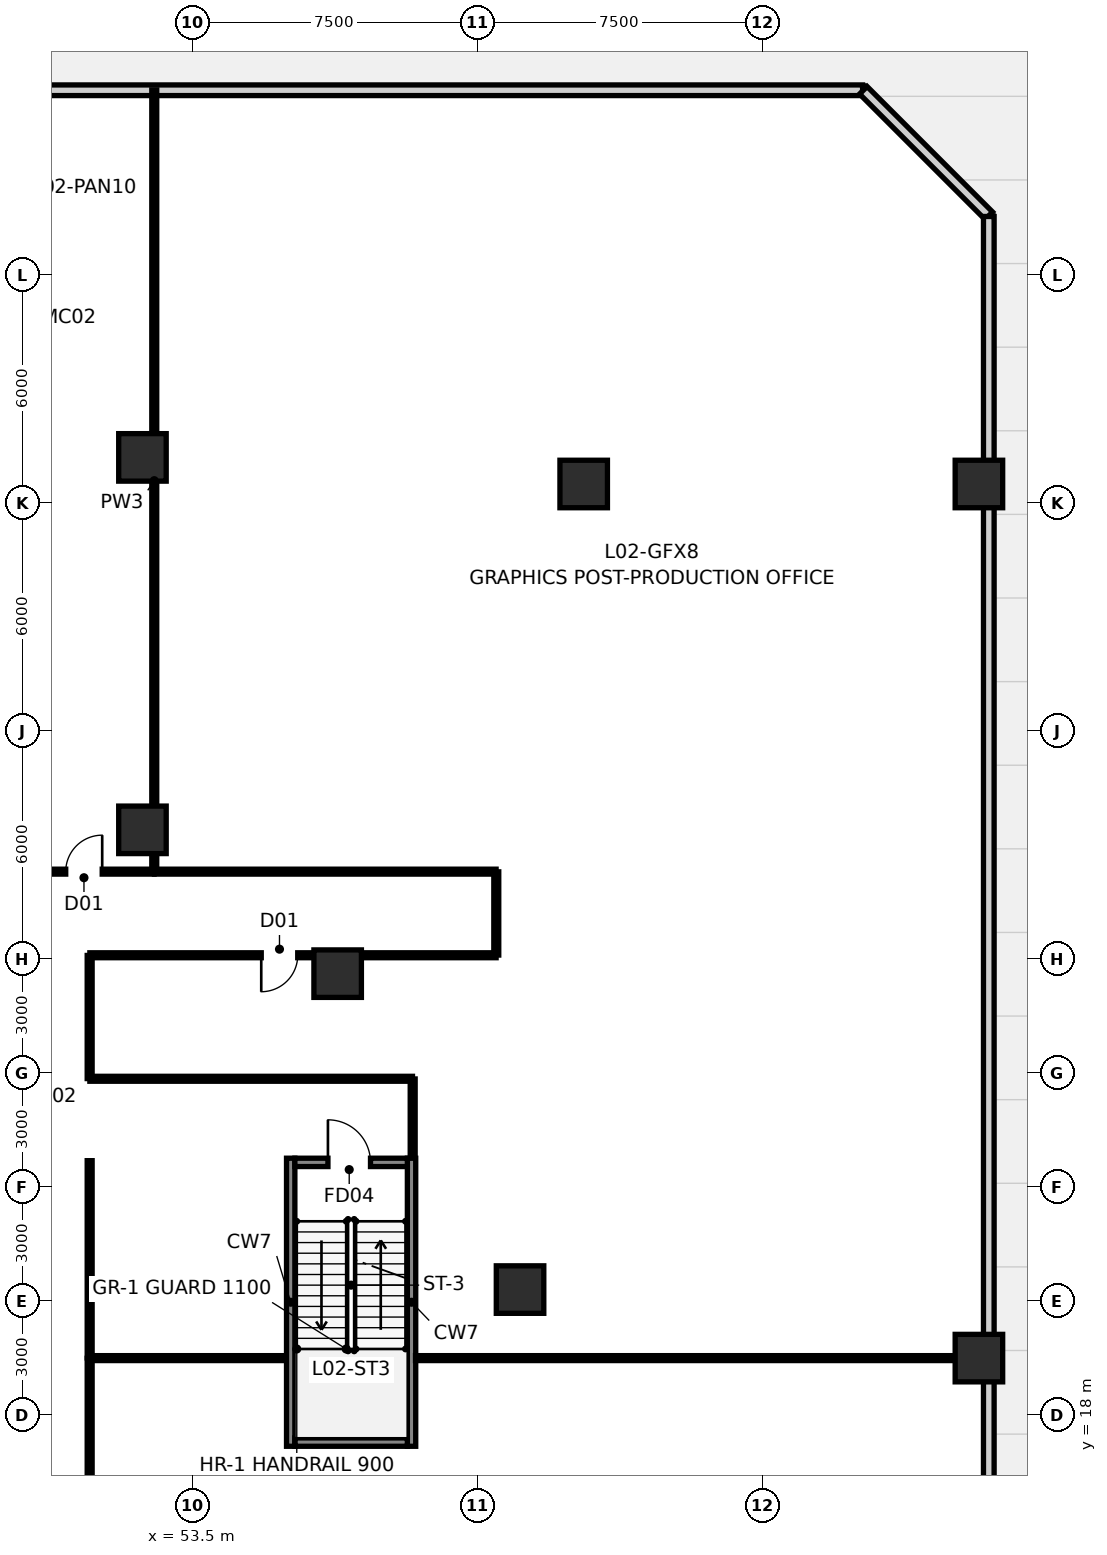
"""IFC4 building model, lengths in metres.
Left out: names, types, materials, properties, quantities, classifications, styles, units other than length and angle.
Written with IfcOpenShell. Run it as: python <this file> out.ifc"""

import sys

from ifc_helpers import new_model, si_unit, direction, frame, frame_2d, origin, origin_2d, place, context, subcontext, project, spatial, rectangle, hollow_rectangle, extrude, source, transform, mapped, element, fill, save


model = new_model("IFC4")
c1 = context("Model", 3, precision=1e-05, world=origin(), true_north=direction((0.0, 1.0)))
c2 = subcontext(c1, "Body", "Model", "MODEL_VIEW")
j1 = project(units=[si_unit("LENGTHUNIT", "METRE"), si_unit("PLANEANGLEUNIT", "RADIAN")], contexts=[c1])
p1 = place(None, origin())
s1 = spatial("IfcSite", under=j1, at=p1, CompositionType="ELEMENT")
p2 = place(p1, origin())
s2 = spatial("IfcBuilding", under=s1, at=p2, CompositionType="ELEMENT")
p3 = place(p2, frame((0.0, 0.0, 10.2)))
s3 = spatial("IfcBuildingStorey", under=s2, at=p3, CompositionType="ELEMENT", Elevation=10.2)
for number, where, z_axis, x_axis in (
    (1, (56.09, 17.18, 0.0), (0.0, 0.0, 1.0), (0.0, 1.0, 0.0)),
    (2, (59.27, 17.18, 0.0), (0.0, 0.0, 1.0), (0.0, 1.0, 0.0)),
):
    element("IfcWall", number, at=place(p3, frame(where, z_axis=z_axis, x_axis=x_axis)), inside=s3, PredefinedType="SHEAR", context=c2, shape_type="SweptSolid", body=[
        extrude(rectangle(XDim=7.58, YDim=0.22, at=frame_2d((3.79, 0.0))), origin(), (0.0, 0.0, 1.0), 4.5),
    ])
p4 = place(p3, frame((56.2, 17.29, 0.0), z_axis=(0.0, 0.0, 1.0), x_axis=(1.0, 0.0, 0.0)))
e3 = element("IfcWall", 3, at=p4, inside=s3, PredefinedType="SHEAR", context=c2, shape_type="SweptSolid", body=[
    extrude(rectangle(XDim=2.96, YDim=0.22, at=frame_2d((1.48, 0.0))), origin(), (0.0, 0.0, 1.0), 4.5),
])
p5 = place(p3, frame((56.2, 24.65, 0.0), z_axis=(0.0, 0.0, 1.0), x_axis=(1.0, 0.0, 0.0)))
e4 = element("IfcWall", 4, at=p5, inside=s3, PredefinedType="SHEAR", context=c2, shape_type="SweptSolid", body=[
    extrude(rectangle(XDim=2.96, YDim=0.22, at=frame_2d((1.48, 0.0))), origin(), (0.0, 0.0, 1.0), 4.5),
])
p6 = place(p5, frame((0.87, 0.0, 0.0)))
e5 = element("IfcOpeningElement", 5, at=p6, cuts=e4, PredefinedType="OPENING", context=c2, shape_type="SweptSolid", body=[
    extrude(rectangle(XDim=1.12, YDim=2.15, at=frame_2d((0.56, 1.075))), frame((0.0, 0.122, 0.0), z_axis=(0.0, -1.0, 0.0), x_axis=(1.0, 0.0, 0.0)), (0.0, 0.0, 1.0), 0.244),
])
m1 = source(origin(), c2, "Body", "SweptSolid", [
    extrude(hollow_rectangle(XDim=1.25, YDim=1.25, WallThickness=0.07, at=origin_2d()), origin(), (0.0, 0.0, 1.0), 4.501),
])
p7 = place(p3, frame((62.125, 21.303, 0.0), z_axis=(-0.010413686595, -0.021532466552, 0.999713913085), x_axis=(0.90024527341, -0.435383104521, 0.0)))
e6 = element("IfcColumn", 6, at=p7, inside=s3, PredefinedType="COLUMN", context=c2, shape_type="MappedRepresentation", body=[
    mapped(m1, transform((0.0, 0.0, 0.0), scale=1.0)),
])
m2 = source(origin(), c2, "Body", "SweptSolid", [
    extrude(hollow_rectangle(XDim=1.25, YDim=1.25, WallThickness=0.07, at=origin_2d()), origin(), (0.0, 0.0, 1.0), 4.501),
])
p8 = place(p3, frame((57.326, 29.616, 0.0), z_axis=(-0.014862398367, -0.013777551771, 0.999794623001), x_axis=(0.679834893806, -0.733365200404, 0.0)))
e7 = element("IfcColumn", 7, at=p8, inside=s3, PredefinedType="COLUMN", context=c2, shape_type="MappedRepresentation", body=[
    mapped(m2, transform((0.0, 0.0, 0.0), scale=1.0)),
])
m3 = source(origin(), c2, "Body", "SweptSolid", [
    extrude(hollow_rectangle(XDim=1.25, YDim=1.25, WallThickness=0.07, at=origin_2d()), origin(), (0.0, 0.0, 1.0), 4.5),
])
for number, where, z_axis, x_axis in (
    (8, (52.189, 33.4, 0.0), (0.0, 0.0, 1.0), (1.0, 0.0, 0.0)),
    (9, (52.189, 43.2, 0.0), (0.0, 0.0, 1.0), (1.0, 0.0, 0.0)),
    (10, (74.2, 19.5, 0.0), (0.0, 0.0, 1.0), (1.0, 0.0, 0.0)),
    (11, (74.2, 42.5, 0.0), (0.0, 0.0, 1.0), (1.0, 0.0, 0.0)),
    (12, (63.8, 42.5, 0.0), (0.0, 0.0, 1.0), (1.0, 0.0, 0.0)),
):
    element("IfcColumn", number, at=place(p3, frame(where, z_axis=z_axis, x_axis=x_axis)), inside=s3, PredefinedType="COLUMN", context=c2, shape_type="MappedRepresentation", body=[
        mapped(m3, transform((0.0, 0.0, 0.0), scale=1.0)),
    ])
p9 = place(p3, frame((6.861, 52.86, 0.0), z_axis=(0.0, 0.0, 1.0), x_axis=(1.0, 0.0, 0.0)))
e13 = element("IfcWall", 13, at=p9, inside=s3, PredefinedType="STANDARD", context=c2, shape_type="SweptSolid", body=[
    extrude(rectangle(XDim=64.278, YDim=0.28, at=frame_2d((32.139, 0.0))), origin(), (0.0, 0.0, 1.0), 4.18),
])
p10 = place(p3, frame((71.159, 52.86, 0.0), z_axis=(0.0, 0.0, 1.0), x_axis=(0.707106781187, -0.707106781187, 0.0)))
e14 = element("IfcWall", 14, at=p10, inside=s3, PredefinedType="STANDARD", context=c2, shape_type="SweptSolid", body=[
    extrude(rectangle(XDim=4.668, YDim=0.28, at=frame_2d((2.334, 0.0))), origin(), (0.0, 0.0, 1.0), 4.18),
])
p11 = place(p3, frame((74.46, 49.539, 0.0), z_axis=(0.0, 0.0, 1.0), x_axis=(0.0, -1.0, 0.0)))
e15 = element("IfcWall", 15, at=p11, inside=s3, PredefinedType="STANDARD", context=c2, shape_type="SweptSolid", body=[
    extrude(rectangle(XDim=44.378, YDim=0.28, at=frame_2d((22.189, 0.0))), origin(), (0.0, 0.0, 1.0), 3.165),
])
p12 = place(p3, frame((52.5, 32.305, 0.0), z_axis=(0.0, 0.0, 1.0), x_axis=(0.0, 1.0, 0.0)))
e16 = element("IfcWall", 16, at=p12, inside=s3, PredefinedType="PARTITIONING", context=c2, shape_type="SweptSolid", body=[
    extrude(rectangle(XDim=20.565, YDim=0.13, at=frame_2d((10.283, 0.0))), origin(), (0.0, 0.0, 1.0), 3.165),
])
p13 = place(p3, frame((59.375, 19.5, 0.0), z_axis=(0.0, 0.0, 1.0), x_axis=(1.0, 0.0, 0.0)))
e17 = element("IfcWall", 17, at=p13, inside=s3, PredefinedType="PARTITIONING", context=c2, shape_type="SweptSolid", body=[
    extrude(rectangle(XDim=15.095, YDim=0.13, at=frame_2d((7.547, 0.0))), origin(), (0.0, 0.0, 1.0), 3.165),
])
p14 = place(p3, frame((61.495, 30.1, 0.0), z_axis=(0.0, 0.0, 1.0), x_axis=(-1.0, 0.0, 0.0)))
e18 = element("IfcWall", 18, at=p14, inside=s3, PredefinedType="PARTITIONING", context=c2, shape_type="SweptSolid", body=[
    extrude(rectangle(XDim=10.69, YDim=0.13, at=frame_2d((5.345, 0.0))), origin(), (0.0, 0.0, 1.0), 3.553),
])
p15 = place(p14, frame((5.22, 0.0, 0.0)))
e19 = element("IfcOpeningElement", 19, at=p15, cuts=e18, PredefinedType="OPENING", context=c2, shape_type="SweptSolid", body=[
    extrude(rectangle(XDim=0.96, YDim=2.15, at=frame_2d((0.48, 1.075))), frame((0.0, 0.077, 0.0), z_axis=(0.0, -1.0, 0.0), x_axis=(1.0, 0.0, 0.0)), (0.0, 0.0, 1.0), 0.154),
])
p16 = place(p3, frame((52.505, 32.3, 0.0), z_axis=(0.0, 0.0, 1.0), x_axis=(1.0, 0.0, 0.0)))
e20 = element("IfcWall", 20, at=p16, inside=s3, PredefinedType="PARTITIONING", context=c2, shape_type="SweptSolid", body=[
    extrude(rectangle(XDim=8.99, YDim=0.13, at=frame_2d((4.495, 0.0))), origin(), (0.0, 0.0, 1.0), 4.18),
])
p17 = place(p3, frame((50.805, 26.85, 0.0), z_axis=(0.0, 0.0, 1.0), x_axis=(1.0, 0.0, 0.0)))
e21 = element("IfcWall", 21, at=p17, inside=s3, PredefinedType="PARTITIONING", context=c2, shape_type="SweptSolid", body=[
    extrude(rectangle(XDim=8.49, YDim=0.13, at=frame_2d((4.245, 0.0))), origin(), (0.0, 0.0, 1.0), 4.18),
])
p18 = place(p3, frame((50.8, 12.205, 0.0), z_axis=(0.0, 0.0, 1.0), x_axis=(0.0, 1.0, 0.0)))
e22 = element("IfcWall", 22, at=p18, inside=s3, PredefinedType="PARTITIONING", context=c2, shape_type="SweptSolid", body=[
    extrude(rectangle(XDim=7.29, YDim=0.13, at=frame_2d((3.645, 0.0))), origin(), (0.0, 0.0, 1.0), 4.18),
])
p19 = place(p18, frame((3.165, 0.0, 0.0)))
e23 = element("IfcOpeningElement", 23, at=p19, cuts=e22, PredefinedType="OPENING", context=c2, shape_type="SweptSolid", body=[
    extrude(rectangle(XDim=0.96, YDim=2.15, at=frame_2d((0.48, 1.075))), frame((0.0, 0.077, 0.0), z_axis=(0.0, -1.0, 0.0), x_axis=(1.0, 0.0, 0.0)), (0.0, 0.0, 1.0), 0.154),
])
p20 = place(p3, frame((50.805, 19.5, 0.0), z_axis=(0.0, 0.0, 1.0), x_axis=(1.0, 0.0, 0.0)))
e24 = element("IfcWall", 24, at=p20, inside=s3, PredefinedType="PARTITIONING", context=c2, shape_type="SweptSolid", body=[
    extrude(rectangle(XDim=5.17, YDim=0.13, at=frame_2d((2.585, 0.0))), origin(), (0.0, 0.0, 1.0), 4.18),
])
p21 = place(p3, frame((50.8, 24.695, 0.0), z_axis=(0.0, 0.0, 1.0), x_axis=(0.0, -1.0, 0.0)))
e25 = element("IfcWall", 25, at=p21, inside=s3, PredefinedType="PARTITIONING", context=c2, shape_type="SweptSolid", body=[
    extrude(rectangle(XDim=5.19, YDim=0.13, at=frame_2d((2.595, 0.0))), origin(), (0.0, 0.0, 1.0), 4.18),
])
p22 = place(p3, frame((48.805, 32.3, 0.0), z_axis=(0.0, 0.0, 1.0), x_axis=(1.0, 0.0, 0.0)))
e26 = element("IfcWall", 26, at=p22, inside=s3, PredefinedType="PARTITIONING", context=c2, shape_type="SweptSolid", body=[
    extrude(rectangle(XDim=3.69, YDim=0.13, at=frame_2d((1.845, 0.0))), origin(), (0.0, 0.0, 1.0), 4.18),
])
p23 = place(p22, frame((1.365, 0.0, 0.0)))
e27 = element("IfcOpeningElement", 27, at=p23, cuts=e26, PredefinedType="OPENING", context=c2, shape_type="SweptSolid", body=[
    extrude(rectangle(XDim=0.96, YDim=2.15, at=frame_2d((0.48, 1.075))), frame((0.0, 0.077, 0.0), z_axis=(0.0, -1.0, 0.0), x_axis=(1.0, 0.0, 0.0)), (0.0, 0.0, 1.0), 0.154),
])
p24 = place(p3, frame((50.8, 30.095, 0.0), z_axis=(0.0, 0.0, 1.0), x_axis=(0.0, -1.0, 0.0)))
e28 = element("IfcWall", 28, at=p24, inside=s3, PredefinedType="PARTITIONING", context=c2, shape_type="SweptSolid", body=[
    extrude(rectangle(XDim=3.24, YDim=0.13, at=frame_2d((1.62, 0.0))), origin(), (0.0, 0.0, 1.0), 4.18),
])
p25 = place(p3, frame((61.5, 32.295, 0.0), z_axis=(0.0, 0.0, 1.0), x_axis=(0.0, -1.0, 0.0)))
e29 = element("IfcWall", 29, at=p25, inside=s3, PredefinedType="PARTITIONING", context=c2, shape_type="SweptSolid", body=[
    extrude(rectangle(XDim=2.19, YDim=0.13, at=frame_2d((1.095, 0.0))), origin(), (0.0, 0.0, 1.0), 4.18),
])
p26 = place(p3, frame((59.3, 26.845, 0.0), z_axis=(0.0, 0.0, 1.0), x_axis=(0.0, -1.0, 0.0)))
e30 = element("IfcWall", 30, at=p26, inside=s3, PredefinedType="PARTITIONING", context=c2, shape_type="SweptSolid", body=[
    extrude(rectangle(XDim=2.07, YDim=0.13, at=frame_2d((1.035, 0.0))), origin(), (0.0, 0.0, 1.0), 4.18),
])
p27 = place(p6, origin())
e31 = element("IfcDoor", 31, at=p27, inside=s3, OperationType="SINGLE_SWING_LEFT", PredefinedType="DOOR", context=c2, shape_type="SweptSolid", body=[
    extrude(rectangle(XDim=1.12, YDim=2.15, at=frame_2d((0.56, 1.075))), frame((0.0, 0.025, 0.0), z_axis=(0.0, -1.0, 0.0), x_axis=(1.0, 0.0, 0.0)), (0.0, 0.0, 1.0), 0.05),
])
fill(e5, e31)
p28 = place(p15, origin())
e32 = element("IfcDoor", 32, at=p28, inside=s3, OperationType="SINGLE_SWING_RIGHT", PredefinedType="DOOR", context=c2, shape_type="SweptSolid", body=[
    extrude(rectangle(XDim=0.96, YDim=2.15, at=frame_2d((0.48, 1.075))), frame((0.0, 0.025, 0.0), z_axis=(0.0, -1.0, 0.0), x_axis=(1.0, 0.0, 0.0)), (0.0, 0.0, 1.0), 0.05),
])
fill(e19, e32)
p29 = place(p23, origin())
e33 = element("IfcDoor", 33, at=p29, inside=s3, OperationType="SINGLE_SWING_RIGHT", PredefinedType="DOOR", context=c2, shape_type="SweptSolid", body=[
    extrude(rectangle(XDim=0.96, YDim=2.15, at=frame_2d((0.48, 1.075))), frame((0.0, 0.025, 0.0), z_axis=(0.0, -1.0, 0.0), x_axis=(1.0, 0.0, 0.0)), (0.0, 0.0, 1.0), 0.05),
])
fill(e27, e33)
save(model, sys.argv[1])
